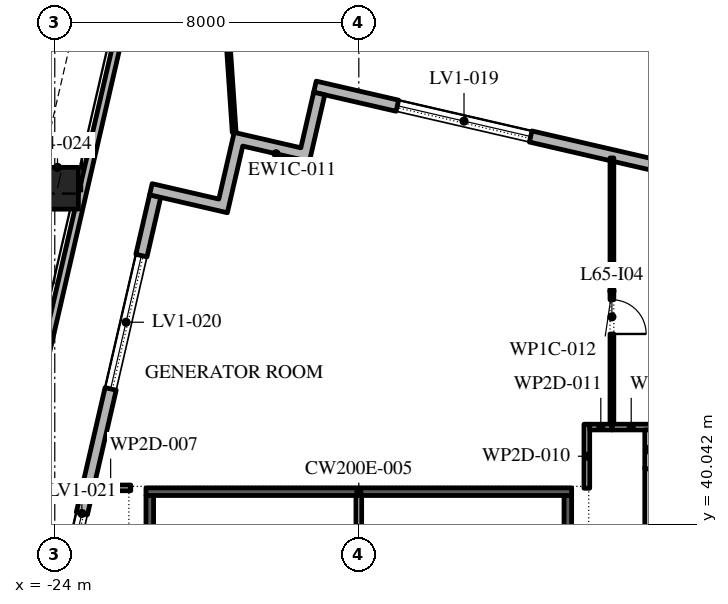
"""IFC4 building model, lengths in metres.
Left out: names, types, materials, properties, quantities, classifications, styles, units other than length and angle.
Written with IfcOpenShell. Run it as: python <this file> out.ifc"""

import sys

from ifc_helpers import new_model, si_unit, direction, frame, frame_2d, origin, origin_2d, place, context, subcontext, project, spatial, polyline, rectangle, outline, extrude, element, fill, save


model = new_model("IFC4")
c1 = context("Model", 3, precision=1e-05, world=origin(), true_north=direction((0.0, 1.0)))
c2 = subcontext(c1, "Body", "Model", "MODEL_VIEW")
j1 = project(units=[si_unit("LENGTHUNIT", "METRE"), si_unit("PLANEANGLEUNIT", "RADIAN")], contexts=[c1])
p1 = place(None, origin())
s1 = spatial("IfcSite", under=j1, at=p1, CompositionType="ELEMENT")
p2 = place(p1, origin())
s2 = spatial("IfcBuilding", under=s1, at=p2, CompositionType="ELEMENT")
p3 = place(p2, frame((0.0, 0.0, 297.6)))
s3 = spatial("IfcBuildingStorey", under=s2, at=p3, CompositionType="ELEMENT", Elevation=297.6)
p4 = place(p3, frame((-23.928, 48.884, 0.0), z_axis=(0.017489271755, 0.075681668239, 0.996978640928), x_axis=(-0.974322688243, 0.225156166193, 0.0)))
e1 = element("IfcColumn", 1, at=p4, inside=s3, PredefinedType="COLUMN", context=c2, shape_type="SweptSolid", body=[
    extrude(rectangle(XDim=1.1, YDim=1.1, at=origin_2d()), origin(), (0.0, 0.0, 1.0), 5.416),
])
p5 = place(p3, frame((29.616, 40.758, 0.0), z_axis=(0.0, 0.0, 1.0), x_axis=(-0.974370532314, 0.224949029246, 0.0)))
e2 = element("IfcWall", 2, at=p5, inside=s3, PredefinedType="STANDARD", context=c2, shape_type="SweptSolid", body=[
    extrude(rectangle(XDim=48.0, YDim=0.3, at=frame_2d((24.0, 0.0))), origin(), (0.0, 0.0, 1.0), 4.95),
])
p6 = place(p5, frame((2.075, 0.0, 0.6)))
e3 = element("IfcOpeningElement", 3, at=p6, cuts=e2, PredefinedType="OPENING", context=c2, shape_type="SweptSolid", body=[
    extrude(rectangle(XDim=3.6, YDim=3.9, at=frame_2d((1.8, 1.95))), frame((0.0, 0.16, 0.0), z_axis=(0.0, -1.0, 0.0), x_axis=(1.0, 0.0, 0.0)), (0.0, 0.0, 1.0), 0.32),
])
p7 = place(p5, frame((9.975, 0.0, 0.6)))
e4 = element("IfcOpeningElement", 4, at=p7, cuts=e2, PredefinedType="OPENING", context=c2, shape_type="SweptSolid", body=[
    extrude(rectangle(XDim=3.6, YDim=3.55, at=frame_2d((1.8, 1.775))), frame((0.0, 0.16, 0.0), z_axis=(0.0, -1.0, 0.0), x_axis=(1.0, 0.0, 0.0)), (0.0, 0.0, 1.0), 0.32),
])
p8 = place(p5, frame((18.025, 0.0, 0.6)))
e5 = element("IfcOpeningElement", 5, at=p8, cuts=e2, PredefinedType="OPENING", context=c2, shape_type="SweptSolid", body=[
    extrude(rectangle(XDim=3.6, YDim=3.55, at=frame_2d((1.8, 1.775))), frame((0.0, 0.16, 0.0), z_axis=(0.0, -1.0, 0.0), x_axis=(1.0, 0.0, 0.0)), (0.0, 0.0, 1.0), 0.32),
])
p9 = place(p5, frame((26.075, 0.0, 0.6)))
e6 = element("IfcOpeningElement", 6, at=p9, cuts=e2, PredefinedType="OPENING", context=c2, shape_type="SweptSolid", body=[
    extrude(rectangle(XDim=3.6, YDim=3.9, at=frame_2d((1.8, 1.95))), frame((0.0, 0.16, 0.0), z_axis=(0.0, -1.0, 0.0), x_axis=(1.0, 0.0, 0.0)), (0.0, 0.0, 1.0), 0.32),
])
p10 = place(p5, frame((34.125, 0.0, 0.6)))
e7 = element("IfcOpeningElement", 7, at=p10, cuts=e2, PredefinedType="OPENING", context=c2, shape_type="SweptSolid", body=[
    extrude(rectangle(XDim=3.6, YDim=3.55, at=frame_2d((1.8, 1.775))), frame((0.0, 0.16, 0.0), z_axis=(0.0, -1.0, 0.0), x_axis=(1.0, 0.0, 0.0)), (0.0, 0.0, 1.0), 0.32),
])
p11 = place(p5, frame((42.175, 0.0, 0.6)))
e8 = element("IfcOpeningElement", 8, at=p11, cuts=e2, PredefinedType="OPENING", context=c2, shape_type="SweptSolid", body=[
    extrude(rectangle(XDim=3.6, YDim=3.9, at=frame_2d((1.8, 1.95))), frame((0.0, 0.16, 0.0), z_axis=(0.0, -1.0, 0.0), x_axis=(1.0, 0.0, 0.0)), (0.0, 0.0, 1.0), 0.32),
])
p12 = place(p3, frame((-21.359, 48.678, 0.0), z_axis=(0.0, 0.0, 1.0), x_axis=(-0.224949219336, -0.974370488428, 0.0)))
e9 = element("IfcWall", 9, at=p12, inside=s3, PredefinedType="STANDARD", context=c2, shape_type="SweptSolid", body=[
    extrude(rectangle(XDim=30.011, YDim=0.3, at=frame_2d((15.006, 0.0))), origin(), (0.0, 0.0, 1.0), 4.95),
])
p13 = place(p12, frame((1.607, 0.0, 0.6)))
e10 = element("IfcOpeningElement", 10, at=p13, cuts=e9, PredefinedType="OPENING", context=c2, shape_type="SweptSolid", body=[
    extrude(rectangle(XDim=3.6, YDim=3.9, at=frame_2d((1.8, 1.95))), frame((0.0, 0.16, 0.0), z_axis=(0.0, -1.0, 0.0), x_axis=(1.0, 0.0, 0.0)), (0.0, 0.0, 1.0), 0.32),
])
p14 = place(p12, frame((8.571, 0.0, 0.6)))
e11 = element("IfcOpeningElement", 11, at=p14, cuts=e9, PredefinedType="OPENING", context=c2, shape_type="SweptSolid", body=[
    extrude(rectangle(XDim=3.6, YDim=3.9, at=frame_2d((1.8, 1.95))), frame((0.0, 0.16, 0.0), z_axis=(0.0, -1.0, 0.0), x_axis=(1.0, 0.0, 0.0)), (0.0, 0.0, 1.0), 0.32),
])
p15 = place(p12, frame((15.686, 0.0, 0.6)))
e12 = element("IfcOpeningElement", 12, at=p15, cuts=e9, PredefinedType="OPENING", context=c2, shape_type="SweptSolid", body=[
    extrude(rectangle(XDim=3.6, YDim=3.9, at=frame_2d((1.8, 1.95))), frame((0.0, 0.16, 0.0), z_axis=(0.0, -1.0, 0.0), x_axis=(1.0, 0.0, 0.0)), (0.0, 0.0, 1.0), 0.32),
])
p16 = place(p3, origin())
e13 = element("IfcWall", 13, at=p16, inside=s3, PredefinedType="STANDARD", context=c2, shape_type="SweptSolid", body=[
    extrude(outline(polyline([(-21.505, 48.712), (-21.438, 49.004), (-19.684, 48.599), (-19.279, 50.353), (-17.525, 49.948), (-17.188, 51.41), (-16.895, 51.342), (-17.3, 49.588), (-19.054, 49.993), (-19.459, 48.24), (-21.505, 48.712)])), origin(), (0.0, 0.0, 1.0), 4.95),
])
p17 = place(p3, frame((33.159, 47.524, -0.05), z_axis=(0.0, 0.0, 1.0), x_axis=(-0.974370681559, 0.224948382787, 0.0)))
e14 = element("IfcWall", 14, at=p17, inside=s3, PredefinedType="STANDARD", context=c2, shape_type="SweptSolid", body=[
    extrude(rectangle(XDim=51.76, YDim=0.2, at=frame_2d((25.88, 0.0))), origin(), (0.0, 0.0, 1.0), 1.1),
])
p18 = place(p3, frame((-21.517, 56.35, -0.05), z_axis=(0.0, 0.0, 1.0), x_axis=(-0.224951435492, -0.97436997679, 0.0)))
e15 = element("IfcWall", 15, at=p18, inside=s3, PredefinedType="STANDARD", context=c2, shape_type="SweptSolid", body=[
    extrude(rectangle(XDim=58.769, YDim=0.2, at=frame_2d((29.385, 0.0))), origin(), (0.0, 0.0, 1.0), 1.1),
])
p19 = place(p3, frame((-19.279, 50.353, -0.05), z_axis=(0.0, 0.0, 1.0), x_axis=(-0.067645197013, 0.997709440329, 0.0)))
e16 = element("IfcWall", 16, at=p19, inside=s3, PredefinedType="STANDARD", context=c2, shape_type="SweptSolid", body=[
    extrude(rectangle(XDim=7.467, YDim=0.1, at=frame_2d((3.734, 0.0))), origin(), (0.0, 0.0, 1.0), 5.0),
])
p20 = place(p3, frame((-21.5, 25.75, 0.0), z_axis=(0.0, 0.0, 1.0), x_axis=(0.0, 1.0, 0.0)))
e17 = element("IfcWall", 17, at=p20, inside=s3, PredefinedType="SHEAR", context=c2, shape_type="SweptSolid", body=[
    extrude(rectangle(XDim=15.05, YDim=0.2, at=frame_2d((7.525, 0.0))), origin(), (0.0, 0.0, 1.0), 4.95),
])
p21 = place(p20, frame((6.625, 0.0, 0.0)))
e18 = element("IfcOpeningElement", 18, at=p21, cuts=e17, PredefinedType="OPENING", context=c2, shape_type="SweptSolid", body=[
    extrude(rectangle(XDim=1.8, YDim=2.4, at=frame_2d((0.9, 1.2))), frame((0.0, 0.11, 0.0), z_axis=(0.0, -1.0, 0.0), x_axis=(1.0, 0.0, 0.0)), (0.0, 0.0, 1.0), 0.22),
])
p22 = place(p3, frame((-10.5, 25.75, 0.0), z_axis=(0.0, 0.0, 1.0), x_axis=(0.0, 1.0, 0.0)))
e19 = element("IfcWall", 19, at=p22, inside=s3, PredefinedType="SHEAR", context=c2, shape_type="SweptSolid", body=[
    extrude(rectangle(XDim=15.05, YDim=0.2, at=frame_2d((7.525, 0.0))), origin(), (0.0, 0.0, 1.0), 4.95),
])
p23 = place(p22, frame((6.625, 0.0, 0.0)))
e20 = element("IfcOpeningElement", 20, at=p23, cuts=e19, PredefinedType="OPENING", context=c2, shape_type="SweptSolid", body=[
    extrude(rectangle(XDim=1.8, YDim=2.4, at=frame_2d((0.9, 1.2))), frame((0.0, 0.11, 0.0), z_axis=(0.0, -1.0, 0.0), x_axis=(1.0, 0.0, 0.0)), (0.0, 0.0, 1.0), 0.22),
])
p24 = place(p3, frame((-21.6, 40.9, 0.0), z_axis=(0.0, 0.0, 1.0), x_axis=(1.0, 0.0, 0.0)))
e21 = element("IfcWall", 21, at=p24, inside=s3, PredefinedType="SHEAR", context=c2, shape_type="SweptSolid", body=[
    extrude(rectangle(XDim=11.2, YDim=0.2, at=frame_2d((5.6, 0.0))), origin(), (0.0, 0.0, 1.0), 4.95),
])
p25 = place(p3, frame((-16.0, 25.75, 0.0), z_axis=(0.0, 0.0, 1.0), x_axis=(0.0, 1.0, 0.0)))
e22 = element("IfcWall", 22, at=p25, inside=s3, PredefinedType="PARTITIONING", context=c2, shape_type="SweptSolid", body=[
    extrude(rectangle(XDim=15.05, YDim=0.15, at=frame_2d((7.525, 0.0))), origin(), (0.0, 0.0, 1.0), 4.95),
])
p26 = place(p3, frame((-23.06, 41.0, 0.0), z_axis=(0.0, 0.0, 1.0), x_axis=(1.0, 0.0, 0.0)))
e23 = element("IfcWall", 23, at=p26, inside=s3, PredefinedType="PARTITIONING", context=c2, shape_type="SweptSolid", body=[
    extrude(rectangle(XDim=1.06, YDim=0.15, at=frame_2d((0.53, 0.0))), origin(), (0.0, 0.0, 1.0), 4.95),
])
p27 = place(p3, frame((-10.0, 40.99, 0.0), z_axis=(0.0, 0.0, 1.0), x_axis=(0.0, 1.0, 0.0)))
e24 = element("IfcWall", 24, at=p27, inside=s3, PredefinedType="PARTITIONING", context=c2, shape_type="SweptSolid", body=[
    extrude(rectangle(XDim=1.685, YDim=0.15, at=frame_2d((0.843, 0.0))), origin(), (0.0, 0.0, 1.0), 4.95),
])
p28 = place(p3, frame((-9.925, 42.6, 0.0), z_axis=(0.0, 0.0, 1.0), x_axis=(1.0, 0.0, 0.0)))
e25 = element("IfcWall", 25, at=p28, inside=s3, PredefinedType="PARTITIONING", context=c2, shape_type="SweptSolid", body=[
    extrude(rectangle(XDim=0.585, YDim=0.15, at=frame_2d((0.292, 0.0))), origin(), (0.0, 0.0, 1.0), 4.95),
])
p29 = place(p3, frame((-9.34, 42.675, 0.0), z_axis=(0.0, 0.0, 1.0), x_axis=(0.0, 1.0, 0.0)))
e26 = element("IfcWall", 26, at=p29, inside=s3, PredefinedType="PARTITIONING", context=c2, shape_type="SweptSolid", body=[
    extrude(rectangle(XDim=7.006, YDim=0.1, at=frame_2d((3.503, 0.0))), origin(), (0.0, 0.0, 1.0), 4.95),
])
p30 = place(p29, frame((2.375, 0.0, 0.0)))
e27 = element("IfcOpeningElement", 27, at=p30, cuts=e26, PredefinedType="OPENING", context=c2, shape_type="SweptSolid", body=[
    extrude(rectangle(XDim=0.9, YDim=2.1, at=frame_2d((0.45, 1.05))), frame((0.0, 0.06, 0.0), z_axis=(0.0, -1.0, 0.0), x_axis=(1.0, 0.0, 0.0)), (0.0, 0.0, 1.0), 0.12),
])
p31 = place(p3, frame((-9.34, 42.6, 0.0), z_axis=(0.0, 0.0, 1.0), x_axis=(1.0, 0.0, 0.0)))
e28 = element("IfcWall", 28, at=p31, inside=s3, PredefinedType="PARTITIONING", context=c2, shape_type="SweptSolid", body=[
    extrude(rectangle(XDim=1.015, YDim=0.15, at=frame_2d((0.508, 0.0))), origin(), (0.0, 0.0, 1.0), 4.95),
])
p32 = place(p3, frame((-8.4, 41.55, 0.0), z_axis=(0.0, 0.0, 1.0), x_axis=(0.0, -1.0, 0.0)))
e29 = element("IfcWall", 29, at=p32, inside=s3, PredefinedType="PARTITIONING", context=c2, shape_type="SweptSolid", body=[
    extrude(rectangle(XDim=11.6, YDim=0.15, at=frame_2d((5.8, 0.0))), origin(), (0.0, 0.0, 1.0), 4.95),
])
p33 = place(p32, frame((4.15, 0.0, 0.0)))
e30 = element("IfcOpeningElement", 30, at=p33, cuts=e29, PredefinedType="OPENING", context=c2, shape_type="SweptSolid", body=[
    extrude(rectangle(XDim=1.0, YDim=2.1, at=frame_2d((0.5, 1.05))), frame((0.0, 0.085, 0.0), z_axis=(0.0, -1.0, 0.0), x_axis=(1.0, 0.0, 0.0)), (0.0, 0.0, 1.0), 0.17),
])
p34 = place(p3, frame((-8.4, 42.525, 0.0), z_axis=(0.0, 0.0, 1.0), x_axis=(0.0, -1.0, 0.0)))
e31 = element("IfcWall", 31, at=p34, inside=s3, PredefinedType="PARTITIONING", context=c2, shape_type="SweptSolid", body=[
    extrude(rectangle(XDim=1.025, YDim=0.15, at=frame_2d((0.512, 0.0))), origin(), (0.0, 0.0, 1.0), 4.95),
])
p35 = place(p11, origin())
e32 = element("IfcWindow", 32, at=p35, inside=s3, PartitioningType="DOUBLE_PANEL_HORIZONTAL", PredefinedType="WINDOW", context=c2, shape_type="SweptSolid", body=[
    extrude(rectangle(XDim=3.6, YDim=3.9, at=frame_2d((1.8, 1.95))), frame((0.0, 0.03, 0.0), z_axis=(0.0, -1.0, 0.0), x_axis=(1.0, 0.0, 0.0)), (0.0, 0.0, 1.0), 0.06),
])
fill(e8, e32)
p36 = place(p13, origin())
e33 = element("IfcWindow", 33, at=p36, inside=s3, PartitioningType="DOUBLE_PANEL_HORIZONTAL", PredefinedType="WINDOW", context=c2, shape_type="SweptSolid", body=[
    extrude(rectangle(XDim=3.6, YDim=3.9, at=frame_2d((1.8, 1.95))), frame((0.0, 0.03, 0.0), z_axis=(0.0, -1.0, 0.0), x_axis=(1.0, 0.0, 0.0)), (0.0, 0.0, 1.0), 0.06),
])
fill(e10, e33)
p37 = place(p14, origin())
e34 = element("IfcWindow", 34, at=p37, inside=s3, PartitioningType="DOUBLE_PANEL_HORIZONTAL", PredefinedType="WINDOW", context=c2, shape_type="SweptSolid", body=[
    extrude(rectangle(XDim=3.6, YDim=3.9, at=frame_2d((1.8, 1.95))), frame((0.0, 0.03, 0.0), z_axis=(0.0, -1.0, 0.0), x_axis=(1.0, 0.0, 0.0)), (0.0, 0.0, 1.0), 0.06),
])
fill(e11, e34)
p38 = place(p30, frame((0.9, 0.0, 0.0), z_axis=(0.0, 0.0, 1.0), x_axis=(-1.0, 0.0, 0.0)))
e35 = element("IfcDoor", 35, at=p38, inside=s3, OperationType="SINGLE_SWING_LEFT", PredefinedType="DOOR", context=c2, shape_type="SweptSolid", body=[
    extrude(rectangle(XDim=0.9, YDim=2.1, at=frame_2d((0.45, 1.05))), frame((0.0, 0.025, 0.0), z_axis=(0.0, -1.0, 0.0), x_axis=(1.0, 0.0, 0.0)), (0.0, 0.0, 1.0), 0.05),
])
fill(e27, e35)
save(model, sys.argv[1])
